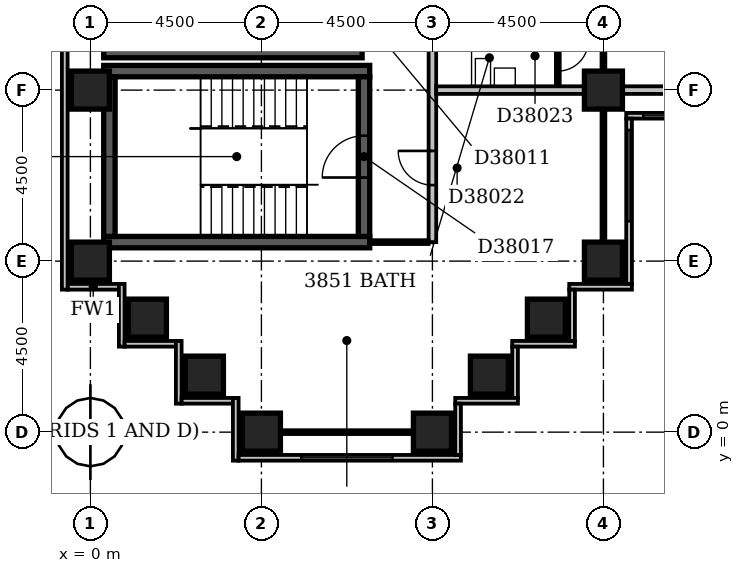
"""IFC4 building model, lengths in metres.
Left out: names, types, materials, properties, quantities, classifications, styles, units other than length and angle.
Written with IfcOpenShell. Run it as: python <this file> out.ifc"""

import sys

from ifc_helpers import new_model, si_unit, direction, frame, frame_2d, origin, origin_2d, place, context, subcontext, project, spatial, rectangle, extrude, element, fill, save


model = new_model("IFC4")
c1 = context("Model", 3, precision=1e-05, world=origin(), true_north=direction((0.0, 1.0)))
c2 = subcontext(c1, "Body", "Model", "MODEL_VIEW")
j1 = project(units=[si_unit("LENGTHUNIT", "METRE"), si_unit("PLANEANGLEUNIT", "RADIAN")], contexts=[c1])
p1 = place(None, origin())
s1 = spatial("IfcSite", under=j1, at=p1, CompositionType="ELEMENT")
p2 = place(p1, origin())
s2 = spatial("IfcBuilding", under=s1, at=p2, CompositionType="ELEMENT")
p3 = place(p2, frame((0.0, 0.0, 152.0)))
s3 = spatial("IfcBuildingStorey", under=s2, at=p3, CompositionType="ELEMENT", Elevation=152.0)
for number, where, z_axis, x_axis in (
    (1, (0.35, 5.0, -0.3), (0.0, 0.0, 1.0), (1.0, 0.0, 0.0)),
    (2, (0.35, 9.5, -0.3), (0.0, 0.0, 1.0), (1.0, 0.0, 0.0)),
):
    element("IfcWall", number, at=place(p3, frame(where, z_axis=z_axis, x_axis=x_axis)), inside=s3, PredefinedType="SHEAR", context=c2, shape_type="SweptSolid", body=[
        extrude(rectangle(XDim=7.0, YDim=0.3, at=frame_2d((3.5, 0.0))), origin(), (0.0, 0.0, 1.0), 3.6),
    ])
p4 = place(p3, frame((0.35, 10.0, -0.3), z_axis=(0.0, 0.0, 1.0), x_axis=(1.0, 0.0, 0.0)))
e3 = element("IfcWall", 3, at=p4, inside=s3, PredefinedType="SHEAR", context=c2, shape_type="SweptSolid", body=[
    extrude(rectangle(XDim=6.8, YDim=0.3, at=frame_2d((3.4, 0.0))), origin(), (0.0, 0.0, 1.0), 3.6),
])
p5 = place(p3, frame((0.5, 5.15, -0.3), z_axis=(0.0, 0.0, 1.0), x_axis=(0.0, 1.0, 0.0)))
e4 = element("IfcWall", 4, at=p5, inside=s3, PredefinedType="SHEAR", context=c2, shape_type="SweptSolid", body=[
    extrude(rectangle(XDim=4.2, YDim=0.3, at=frame_2d((2.1, 0.0))), origin(), (0.0, 0.0, 1.0), 3.6),
])
p6 = place(p3, frame((7.2, 5.15, -0.3), z_axis=(0.0, 0.0, 1.0), x_axis=(0.0, 1.0, 0.0)))
e5 = element("IfcWall", 5, at=p6, inside=s3, PredefinedType="SHEAR", context=c2, shape_type="SweptSolid", body=[
    extrude(rectangle(XDim=4.2, YDim=0.3, at=frame_2d((2.1, 0.0))), origin(), (0.0, 0.0, 1.0), 3.6),
])
p7 = place(p6, frame((1.55, 0.0, 0.3)))
e6 = element("IfcOpeningElement", 6, at=p7, cuts=e5, PredefinedType="OPENING", context=c2, shape_type="SweptSolid", body=[
    extrude(rectangle(XDim=1.1, YDim=2.1, at=frame_2d((0.55, 1.05))), frame((0.0, 0.162, 0.0), z_axis=(0.0, -1.0, 0.0), x_axis=(1.0, 0.0, 0.0)), (0.0, 0.0, 1.0), 0.324),
])
for number, where, z_axis, x_axis in (
    (7, (4.5, 0.0, -0.3), (0.0, 0.0, 1.0), (1.0, 0.0, 0.0)),
    (8, (9.0, 0.0, -0.3), (0.0, 0.0, 1.0), (1.0, 0.0, 0.0)),
    (9, (3.0, 1.5, -0.3), (0.0, 0.0, 1.0), (1.0, 0.0, 0.0)),
    (10, (10.5, 1.5, -0.3), (0.0, 0.0, 1.0), (1.0, 0.0, 0.0)),
    (11, (1.5, 3.0, -0.3), (0.0, 0.0, 1.0), (1.0, 0.0, 0.0)),
    (12, (12.0, 3.0, -0.3), (0.0, 0.0, 1.0), (1.0, 0.0, 0.0)),
    (13, (0.0, 4.5, -0.3), (0.0, 0.0, 1.0), (1.0, 0.0, 0.0)),
    (14, (13.5, 4.5, -0.3), (0.0, 0.0, 1.0), (1.0, 0.0, 0.0)),
    (15, (0.0, 9.0, -0.3), (0.0, 0.0, 1.0), (1.0, 0.0, 0.0)),
    (16, (13.5, 9.0, -0.3), (0.0, 0.0, 1.0), (1.0, 0.0, 0.0)),
):
    element("IfcColumn", number, at=place(p3, frame(where, z_axis=z_axis, x_axis=x_axis)), inside=s3, PredefinedType="COLUMN", context=c2, shape_type="SweptSolid", body=[
        extrude(rectangle(XDim=1.0, YDim=1.0, at=origin_2d()), origin(), (0.0, 0.0, 1.0), 3.6),
    ])
p8 = place(p3, frame((9.675, -0.6, 0.0), z_axis=(0.0, 0.0, 1.0), x_axis=(0.0, 1.0, 0.0)))
e17 = element("IfcWall", 17, at=p8, inside=s3, PredefinedType="STANDARD", context=c2, shape_type="SweptSolid", body=[
    extrude(rectangle(XDim=1.35, YDim=0.15, at=frame_2d((0.675, 0.0))), origin(), (0.0, 0.0, 1.0), 2.7),
])
p9 = place(p3, frame((9.6, 0.825, 0.0), z_axis=(0.0, 0.0, 1.0), x_axis=(1.0, 0.0, 0.0)))
e18 = element("IfcWall", 18, at=p9, inside=s3, PredefinedType="STANDARD", context=c2, shape_type="SweptSolid", body=[
    extrude(rectangle(XDim=1.65, YDim=0.15, at=frame_2d((0.825, 0.0))), origin(), (0.0, 0.0, 1.0), 2.7),
])
p10 = place(p3, frame((11.175, 0.9, 0.0), z_axis=(0.0, 0.0, 1.0), x_axis=(0.0, 1.0, 0.0)))
e19 = element("IfcWall", 19, at=p10, inside=s3, PredefinedType="STANDARD", context=c2, shape_type="SweptSolid", body=[
    extrude(rectangle(XDim=1.35, YDim=0.15, at=frame_2d((0.675, 0.0))), origin(), (0.0, 0.0, 1.0), 2.7),
])
p11 = place(p3, frame((11.1, 2.325, 0.0), z_axis=(0.0, 0.0, 1.0), x_axis=(1.0, 0.0, 0.0)))
e20 = element("IfcWall", 20, at=p11, inside=s3, PredefinedType="STANDARD", context=c2, shape_type="SweptSolid", body=[
    extrude(rectangle(XDim=1.65, YDim=0.15, at=frame_2d((0.825, 0.0))), origin(), (0.0, 0.0, 1.0), 2.7),
])
p12 = place(p3, frame((12.675, 2.4, 0.0), z_axis=(0.0, 0.0, 1.0), x_axis=(0.0, 1.0, 0.0)))
e21 = element("IfcWall", 21, at=p12, inside=s3, PredefinedType="STANDARD", context=c2, shape_type="SweptSolid", body=[
    extrude(rectangle(XDim=1.35, YDim=0.15, at=frame_2d((0.675, 0.0))), origin(), (0.0, 0.0, 1.0), 2.7),
])
p13 = place(p3, frame((12.6, 3.825, 0.0), z_axis=(0.0, 0.0, 1.0), x_axis=(1.0, 0.0, 0.0)))
e22 = element("IfcWall", 22, at=p13, inside=s3, PredefinedType="STANDARD", context=c2, shape_type="SweptSolid", body=[
    extrude(rectangle(XDim=1.65, YDim=0.15, at=frame_2d((0.825, 0.0))), origin(), (0.0, 0.0, 1.0), 2.7),
])
p14 = place(p3, frame((14.175, 3.9, 0.0), z_axis=(0.0, 0.0, 1.0), x_axis=(0.0, 1.0, 0.0)))
e23 = element("IfcWall", 23, at=p14, inside=s3, PredefinedType="STANDARD", context=c2, shape_type="SweptSolid", body=[
    extrude(rectangle(XDim=4.35, YDim=0.15, at=frame_2d((2.175, 0.0))), origin(), (0.0, 0.0, 1.0), 2.7),
])
p15 = place(p14, frame((1.65, 0.0, 0.6)))
e24 = element("IfcOpeningElement", 24, at=p15, cuts=e23, PredefinedType="OPENING", context=c2, shape_type="SweptSolid", body=[
    extrude(rectangle(XDim=2.4, YDim=1.8, at=frame_2d((1.2, 0.9))), frame((0.0, 0.087, 0.0), z_axis=(0.0, -1.0, 0.0), x_axis=(1.0, 0.0, 0.0)), (0.0, 0.0, 1.0), 0.174),
])
p16 = place(p3, frame((14.1, 8.325, 0.0), z_axis=(0.0, 0.0, 1.0), x_axis=(1.0, 0.0, 0.0)))
e25 = element("IfcWall", 25, at=p16, inside=s3, PredefinedType="STANDARD", context=c2, shape_type="SweptSolid", body=[
    extrude(rectangle(XDim=4.65, YDim=0.15, at=frame_2d((2.325, 0.0))), origin(), (0.0, 0.0, 1.0), 2.7),
])
p17 = place(p16, frame((0.45, 0.0, 0.6)))
e26 = element("IfcOpeningElement", 26, at=p17, cuts=e25, PredefinedType="OPENING", context=c2, shape_type="SweptSolid", body=[
    extrude(rectangle(XDim=2.4, YDim=1.8, at=frame_2d((1.2, 0.9))), frame((0.0, 0.087, 0.0), z_axis=(0.0, -1.0, 0.0), x_axis=(1.0, 0.0, 0.0)), (0.0, 0.0, 1.0), 0.174),
])
p18 = place(p3, frame((-0.675, 59.1, 0.0), z_axis=(0.0, 0.0, 1.0), x_axis=(0.0, -1.0, 0.0)))
e27 = element("IfcWall", 27, at=p18, inside=s3, PredefinedType="STANDARD", context=c2, shape_type="SweptSolid", body=[
    extrude(rectangle(XDim=55.35, YDim=0.15, at=frame_2d((27.675, 0.0))), origin(), (0.0, 0.0, 1.0), 2.7),
])
p19 = place(p3, frame((-0.6, 3.825, 0.0), z_axis=(0.0, 0.0, 1.0), x_axis=(1.0, 0.0, 0.0)))
e28 = element("IfcWall", 28, at=p19, inside=s3, PredefinedType="STANDARD", context=c2, shape_type="SweptSolid", body=[
    extrude(rectangle(XDim=1.35, YDim=0.15, at=frame_2d((0.675, 0.0))), origin(), (0.0, 0.0, 1.0), 2.7),
])
p20 = place(p3, frame((0.825, 3.9, 0.0), z_axis=(0.0, 0.0, 1.0), x_axis=(0.0, -1.0, 0.0)))
e29 = element("IfcWall", 29, at=p20, inside=s3, PredefinedType="STANDARD", context=c2, shape_type="SweptSolid", body=[
    extrude(rectangle(XDim=1.65, YDim=0.15, at=frame_2d((0.825, 0.0))), origin(), (0.0, 0.0, 1.0), 2.7),
])
p21 = place(p3, frame((0.9, 2.325, 0.0), z_axis=(0.0, 0.0, 1.0), x_axis=(1.0, 0.0, 0.0)))
e30 = element("IfcWall", 30, at=p21, inside=s3, PredefinedType="STANDARD", context=c2, shape_type="SweptSolid", body=[
    extrude(rectangle(XDim=1.35, YDim=0.15, at=frame_2d((0.675, 0.0))), origin(), (0.0, 0.0, 1.0), 2.7),
])
p22 = place(p3, frame((2.325, 2.4, 0.0), z_axis=(0.0, 0.0, 1.0), x_axis=(0.0, -1.0, 0.0)))
e31 = element("IfcWall", 31, at=p22, inside=s3, PredefinedType="STANDARD", context=c2, shape_type="SweptSolid", body=[
    extrude(rectangle(XDim=1.65, YDim=0.15, at=frame_2d((0.825, 0.0))), origin(), (0.0, 0.0, 1.0), 2.7),
])
p23 = place(p3, frame((2.4, 0.825, 0.0), z_axis=(0.0, 0.0, 1.0), x_axis=(1.0, 0.0, 0.0)))
e32 = element("IfcWall", 32, at=p23, inside=s3, PredefinedType="STANDARD", context=c2, shape_type="SweptSolid", body=[
    extrude(rectangle(XDim=1.35, YDim=0.15, at=frame_2d((0.675, 0.0))), origin(), (0.0, 0.0, 1.0), 2.7),
])
p24 = place(p3, frame((3.825, 0.9, 0.0), z_axis=(0.0, 0.0, 1.0), x_axis=(0.0, -1.0, 0.0)))
e33 = element("IfcWall", 33, at=p24, inside=s3, PredefinedType="STANDARD", context=c2, shape_type="SweptSolid", body=[
    extrude(rectangle(XDim=1.65, YDim=0.15, at=frame_2d((0.825, 0.0))), origin(), (0.0, 0.0, 1.0), 2.7),
])
p25 = place(p3, frame((3.9, -0.675, 0.0), z_axis=(0.0, 0.0, 1.0), x_axis=(1.0, 0.0, 0.0)))
e34 = element("IfcWall", 34, at=p25, inside=s3, PredefinedType="STANDARD", context=c2, shape_type="SweptSolid", body=[
    extrude(rectangle(XDim=5.85, YDim=0.15, at=frame_2d((2.925, 0.0))), origin(), (0.0, 0.0, 1.0), 2.7),
])
p26 = place(p25, frame((1.65, 0.0, 0.6)))
e35 = element("IfcOpeningElement", 35, at=p26, cuts=e34, PredefinedType="OPENING", context=c2, shape_type="SweptSolid", body=[
    extrude(rectangle(XDim=2.4, YDim=1.8, at=frame_2d((1.2, 0.9))), frame((0.0, 0.087, 0.0), z_axis=(0.0, -1.0, 0.0), x_axis=(1.0, 0.0, 0.0)), (0.0, 0.0, 1.0), 0.174),
])
p27 = place(p3, frame((5.0, 0.0, 0.0), z_axis=(0.0, 0.0, 1.0), x_axis=(1.0, 0.0, 0.0)))
e36 = element("IfcWall", 36, at=p27, inside=s3, PredefinedType="PARTITIONING", context=c2, shape_type="SweptSolid", body=[
    extrude(rectangle(XDim=3.5, YDim=0.1, at=frame_2d((1.75, 0.0))), origin(), (0.0, 0.0, 1.0), 2.7),
])
p28 = place(p3, frame((0.0, 4.5, 0.0), z_axis=(0.0, 0.0, 1.0), x_axis=(0.0, 1.0, 0.0)))
e37 = element("IfcWall", 37, at=p28, inside=s3, PredefinedType="PARTITIONING", context=c2, shape_type="SweptSolid", body=[
    extrude(rectangle(XDim=0.5, YDim=0.1, at=frame_2d((0.25, 0.0))), origin(), (0.0, 0.0, 1.0), 2.7),
])
p29 = place(p3, frame((7.349, 5.0, 0.0), z_axis=(0.0, 0.0, 1.0), x_axis=(1.0, 0.0, 0.0)))
e38 = element("IfcWall", 38, at=p29, inside=s3, PredefinedType="PARTITIONING", context=c2, shape_type="SweptSolid", body=[
    extrude(rectangle(XDim=1.551, YDim=0.1, at=frame_2d((0.775, 0.0))), origin(), (0.0, 0.0, 1.0), 3.3),
])
p30 = place(p3, frame((9.0, 5.0, 0.0), z_axis=(0.0, 0.0, 1.0), x_axis=(0.0, 1.0, 0.0)))
e39 = element("IfcWall", 39, at=p30, inside=s3, PredefinedType="PARTITIONING", context=c2, shape_type="SweptSolid", body=[
    extrude(rectangle(XDim=27.75, YDim=0.2, at=frame_2d((13.875, 0.0))), origin(), (0.0, 0.0, 1.0), 3.3),
])
p31 = place(p30, frame((22.8, 0.0, 0.0)))
e40 = element("IfcOpeningElement", 40, at=p31, cuts=e39, PredefinedType="OPENING", context=c2, shape_type="SweptSolid", body=[
    extrude(rectangle(XDim=1.0, YDim=2.1, at=frame_2d((0.5, 1.05))), frame((0.0, 0.112, 0.0), z_axis=(0.0, -1.0, 0.0), x_axis=(1.0, 0.0, 0.0)), (0.0, 0.0, 1.0), 0.224),
])
p32 = place(p30, frame((14.95, 0.0, 0.0)))
e41 = element("IfcOpeningElement", 41, at=p32, cuts=e39, PredefinedType="OPENING", context=c2, shape_type="SweptSolid", body=[
    extrude(rectangle(XDim=1.0, YDim=2.1, at=frame_2d((0.5, 1.05))), frame((0.0, 0.112, 0.0), z_axis=(0.0, -1.0, 0.0), x_axis=(1.0, 0.0, 0.0)), (0.0, 0.0, 1.0), 0.224),
])
p33 = place(p30, frame((10.45, 0.0, 0.0)))
e42 = element("IfcOpeningElement", 42, at=p33, cuts=e39, PredefinedType="OPENING", context=c2, shape_type="SweptSolid", body=[
    extrude(rectangle(XDim=1.0, YDim=2.1, at=frame_2d((0.5, 1.05))), frame((0.0, 0.112, 0.0), z_axis=(0.0, -1.0, 0.0), x_axis=(1.0, 0.0, 0.0)), (0.0, 0.0, 1.0), 0.224),
])
p34 = place(p30, frame((5.95, 0.0, 0.0)))
e43 = element("IfcOpeningElement", 43, at=p34, cuts=e39, PredefinedType="OPENING", context=c2, shape_type="SweptSolid", body=[
    extrude(rectangle(XDim=1.0, YDim=2.1, at=frame_2d((0.5, 1.05))), frame((0.0, 0.112, 0.0), z_axis=(0.0, -1.0, 0.0), x_axis=(1.0, 0.0, 0.0)), (0.0, 0.0, 1.0), 0.224),
])
p35 = place(p30, frame((1.5, 0.0, 0.0)))
e44 = element("IfcOpeningElement", 44, at=p35, cuts=e39, PredefinedType="OPENING", context=c2, shape_type="SweptSolid", body=[
    extrude(rectangle(XDim=0.9, YDim=2.1, at=frame_2d((0.45, 1.05))), frame((0.0, 0.112, 0.0), z_axis=(0.0, -1.0, 0.0), x_axis=(1.0, 0.0, 0.0)), (0.0, 0.0, 1.0), 0.224),
])
p36 = place(p3, frame((13.5, 5.0, 0.0), z_axis=(0.0, 0.0, 1.0), x_axis=(0.0, 1.0, 0.0)))
e45 = element("IfcWall", 45, at=p36, inside=s3, PredefinedType="PARTITIONING", context=c2, shape_type="SweptSolid", body=[
    extrude(rectangle(XDim=3.5, YDim=0.1, at=frame_2d((1.75, 0.0))), origin(), (0.0, 0.0, 1.0), 2.7),
])
p37 = place(p3, frame((9.1, 9.0, 0.0), z_axis=(0.0, 0.0, 1.0), x_axis=(1.0, 0.0, 0.0)))
e46 = element("IfcWall", 46, at=p37, inside=s3, PredefinedType="PARTITIONING", context=c2, shape_type="SweptSolid", body=[
    extrude(rectangle(XDim=3.9, YDim=0.2, at=frame_2d((1.95, 0.0))), origin(), (0.0, 0.0, 1.0), 3.3),
])
p38 = place(p3, frame((14.0, 9.0, 0.0), z_axis=(0.0, 0.0, 1.0), x_axis=(1.0, 0.0, 0.0)))
e47 = element("IfcWall", 47, at=p38, inside=s3, PredefinedType="PARTITIONING", context=c2, shape_type="SweptSolid", body=[
    extrude(rectangle(XDim=3.5, YDim=0.2, at=frame_2d((1.75, 0.0))), origin(), (0.0, 0.0, 1.0), 2.7),
])
p39 = place(p3, frame((12.3, 9.1, 0.0), z_axis=(0.0, 0.0, 1.0), x_axis=(0.0, 1.0, 0.0)))
e48 = element("IfcWall", 48, at=p39, inside=s3, PredefinedType="PARTITIONING", context=c2, shape_type="SweptSolid", body=[
    extrude(rectangle(XDim=1.6, YDim=0.1, at=frame_2d((0.8, 0.0))), origin(), (0.0, 0.0, 1.0), 3.3),
])
p40 = place(p39, frame((0.4, 0.0, 0.0)))
e49 = element("IfcOpeningElement", 49, at=p40, cuts=e48, PredefinedType="OPENING", context=c2, shape_type="SweptSolid", body=[
    extrude(rectangle(XDim=0.8, YDim=2.1, at=frame_2d((0.4, 1.05))), frame((0.0, 0.062, 0.0), z_axis=(0.0, -1.0, 0.0), x_axis=(1.0, 0.0, 0.0)), (0.0, 0.0, 1.0), 0.124),
])
p41 = place(p3, frame((13.5, 9.5, 0.0), z_axis=(0.0, 0.0, 1.0), x_axis=(0.0, 1.0, 0.0)))
e50 = element("IfcWall", 50, at=p41, inside=s3, PredefinedType="PARTITIONING", context=c2, shape_type="SweptSolid", body=[
    extrude(rectangle(XDim=8.4, YDim=0.1, at=frame_2d((4.2, 0.0))), origin(), (0.0, 0.0, 1.0), 3.3),
])
p42 = place(p41, frame((5.8, 0.0, 0.0)))
e51 = element("IfcOpeningElement", 51, at=p42, cuts=e50, PredefinedType="OPENING", context=c2, shape_type="SweptSolid", body=[
    extrude(rectangle(XDim=0.9, YDim=2.1, at=frame_2d((0.45, 1.05))), frame((0.0, 0.062, 0.0), z_axis=(0.0, -1.0, 0.0), x_axis=(1.0, 0.0, 0.0)), (0.0, 0.0, 1.0), 0.124),
])
p43 = place(p41, frame((1.3, 0.0, 0.0)))
e52 = element("IfcOpeningElement", 52, at=p43, cuts=e50, PredefinedType="OPENING", context=c2, shape_type="SweptSolid", body=[
    extrude(rectangle(XDim=0.9, YDim=2.1, at=frame_2d((0.45, 1.05))), frame((0.0, 0.062, 0.0), z_axis=(0.0, -1.0, 0.0), x_axis=(1.0, 0.0, 0.0)), (0.0, 0.0, 1.0), 0.124),
])
p44 = place(p15, origin())
e53 = element("IfcWindow", 53, at=p44, inside=s3, PartitioningType="SINGLE_PANEL", PredefinedType="WINDOW", context=c2, shape_type="SweptSolid", body=[
    extrude(rectangle(XDim=2.4, YDim=1.8, at=frame_2d((1.2, 0.9))), frame((0.0, 0.03, 0.0), z_axis=(0.0, -1.0, 0.0), x_axis=(1.0, 0.0, 0.0)), (0.0, 0.0, 1.0), 0.06),
])
fill(e24, e53)
p45 = place(p17, origin())
e54 = element("IfcWindow", 54, at=p45, inside=s3, PartitioningType="SINGLE_PANEL", PredefinedType="WINDOW", context=c2, shape_type="SweptSolid", body=[
    extrude(rectangle(XDim=2.4, YDim=1.8, at=frame_2d((1.2, 0.9))), frame((0.0, 0.03, 0.0), z_axis=(0.0, -1.0, 0.0), x_axis=(1.0, 0.0, 0.0)), (0.0, 0.0, 1.0), 0.06),
])
fill(e26, e54)
p46 = place(p26, origin())
e55 = element("IfcWindow", 55, at=p46, inside=s3, PartitioningType="SINGLE_PANEL", PredefinedType="WINDOW", context=c2, shape_type="SweptSolid", body=[
    extrude(rectangle(XDim=2.4, YDim=1.8, at=frame_2d((1.2, 0.9))), frame((0.0, 0.03, 0.0), z_axis=(0.0, -1.0, 0.0), x_axis=(1.0, 0.0, 0.0)), (0.0, 0.0, 1.0), 0.06),
])
fill(e35, e55)
p47 = place(p7, origin())
e56 = element("IfcDoor", 56, at=p47, inside=s3, OperationType="SINGLE_SWING_LEFT", PredefinedType="DOOR", context=c2, shape_type="SweptSolid", body=[
    extrude(rectangle(XDim=1.1, YDim=2.1, at=frame_2d((0.55, 1.05))), frame((0.0, 0.025, 0.0), z_axis=(0.0, -1.0, 0.0), x_axis=(1.0, 0.0, 0.0)), (0.0, 0.0, 1.0), 0.05),
])
fill(e6, e56)
p48 = place(p35, frame((0.9, 0.0, 0.0), z_axis=(0.0, 0.0, 1.0), x_axis=(-1.0, 0.0, 0.0)))
e57 = element("IfcDoor", 57, at=p48, inside=s3, OperationType="SINGLE_SWING_LEFT", PredefinedType="DOOR", context=c2, shape_type="SweptSolid", body=[
    extrude(rectangle(XDim=0.9, YDim=2.1, at=frame_2d((0.45, 1.05))), frame((0.0, 0.025, 0.0), z_axis=(0.0, -1.0, 0.0), x_axis=(1.0, 0.0, 0.0)), (0.0, 0.0, 1.0), 0.05),
])
fill(e44, e57)
p49 = place(p40, origin())
e58 = element("IfcDoor", 58, at=p49, inside=s3, OperationType="SINGLE_SWING_RIGHT", PredefinedType="DOOR", context=c2, shape_type="SweptSolid", body=[
    extrude(rectangle(XDim=0.8, YDim=2.1, at=frame_2d((0.4, 1.05))), frame((0.0, 0.025, 0.0), z_axis=(0.0, -1.0, 0.0), x_axis=(1.0, 0.0, 0.0)), (0.0, 0.0, 1.0), 0.05),
])
fill(e49, e58)
save(model, sys.argv[1])
